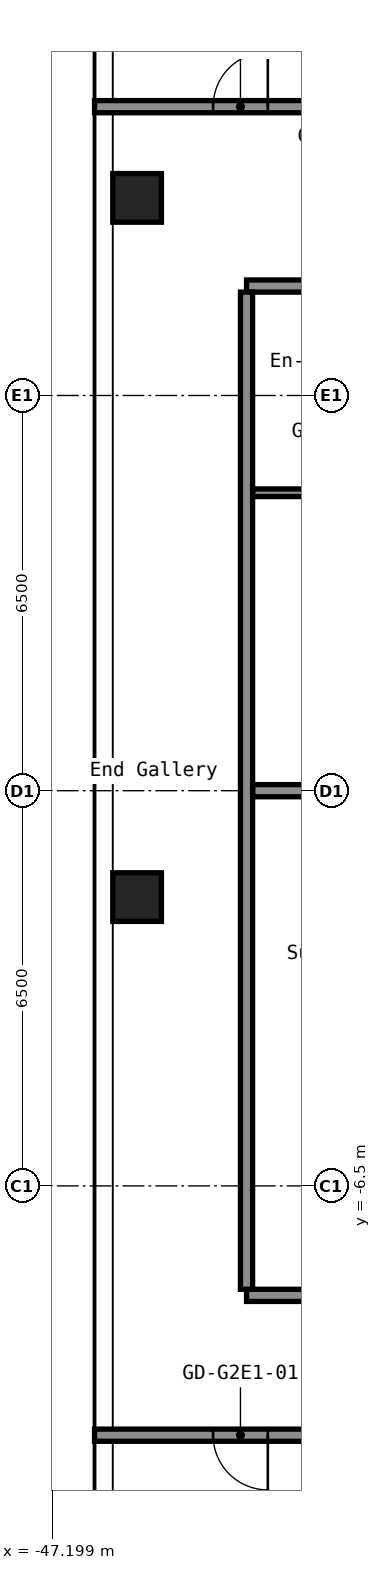
"""IFC4 building model, lengths in metres.
Left out: names, types, materials, properties, quantities, classifications, styles, units other than length and angle.
Written with IfcOpenShell. Run it as: python <this file> out.ifc"""

import sys

from ifc_helpers import new_model, si_unit, direction, frame, frame_2d, origin, origin_2d, place, context, subcontext, project, spatial, rectangle, hollow_rectangle, extrude, element, fill, save


model = new_model("IFC4")
c1 = context("Model", 3, precision=1e-05, world=origin(), true_north=direction((0.0, 1.0)))
c2 = subcontext(c1, "Body", "Model", "MODEL_VIEW")
j1 = project(units=[si_unit("LENGTHUNIT", "METRE"), si_unit("PLANEANGLEUNIT", "RADIAN")], contexts=[c1])
p1 = place(None, origin())
s1 = spatial("IfcSite", under=j1, at=p1, CompositionType="ELEMENT")
p2 = place(p1, origin())
s2 = spatial("IfcBuilding", under=s1, at=p2, CompositionType="ELEMENT")
p3 = place(p2, frame((0.0, 0.0, 104.2)))
s3 = spatial("IfcBuildingStorey", under=s2, at=p3, CompositionType="ELEMENT", Elevation=104.2)
for number, where, z_axis, x_axis in (
    (1, (-45.8, -1.75, 0.0), (0.0, 0.0, 1.0), (1.0, 0.0, 0.0)),
    (2, (-45.8, 9.75, 0.0), (0.0, 0.0, 1.0), (1.0, 0.0, 0.0)),
):
    element("IfcColumn", number, at=place(p3, frame(where, z_axis=z_axis, x_axis=x_axis)), inside=s3, PredefinedType="COLUMN", context=c2, shape_type="SweptSolid", body=[
        extrude(hollow_rectangle(XDim=0.8, YDim=0.8, WallThickness=0.032, at=origin_2d()), origin(), (0.0, 0.0, 1.0), 2.8),
    ])
p4 = place(p3, frame((-46.5, -10.6, 0.0), z_axis=(0.0, 0.0, 1.0), x_axis=(1.0, 0.0, 0.0)))
e3 = element("IfcWall", 3, at=p4, inside=s3, PredefinedType="PARTITIONING", context=c2, shape_type="SweptSolid", body=[
    extrude(rectangle(XDim=29.7, YDim=0.2, at=frame_2d((14.85, 0.0))), origin(), (0.0, 0.0, 1.0), 2.8),
])
p5 = place(p4, frame((1.95, 0.0, 0.0)))
e4 = element("IfcOpeningElement", 4, at=p5, cuts=e3, PredefinedType="OPENING", context=c2, shape_type="SweptSolid", body=[
    extrude(rectangle(XDim=0.9, YDim=2.1, at=frame_2d((0.45, 1.05))), frame((0.0, 0.11, 0.0), z_axis=(0.0, -1.0, 0.0), x_axis=(1.0, 0.0, 0.0)), (0.0, 0.0, 1.0), 0.22),
])
p6 = place(p4, frame((6.74, 0.0, 0.0)))
e5 = element("IfcOpeningElement", 5, at=p6, cuts=e3, PredefinedType="OPENING", context=c2, shape_type="SweptSolid", body=[
    extrude(rectangle(XDim=0.9, YDim=2.1, at=frame_2d((0.45, 1.05))), frame((0.0, 0.11, 0.0), z_axis=(0.0, -1.0, 0.0), x_axis=(1.0, 0.0, 0.0)), (0.0, 0.0, 1.0), 0.22),
])
p7 = place(p4, frame((10.94, 0.0, 0.0)))
e6 = element("IfcOpeningElement", 6, at=p7, cuts=e3, PredefinedType="OPENING", context=c2, shape_type="SweptSolid", body=[
    extrude(rectangle(XDim=0.9, YDim=2.1, at=frame_2d((0.45, 1.05))), frame((0.0, 0.11, 0.0), z_axis=(0.0, -1.0, 0.0), x_axis=(1.0, 0.0, 0.0)), (0.0, 0.0, 1.0), 0.22),
])
p8 = place(p4, frame((14.045, 0.0, 0.0)))
e7 = element("IfcOpeningElement", 7, at=p8, cuts=e3, PredefinedType="OPENING", context=c2, shape_type="SweptSolid", body=[
    extrude(rectangle(XDim=0.9, YDim=2.1, at=frame_2d((0.45, 1.05))), frame((0.0, 0.11, 0.0), z_axis=(0.0, -1.0, 0.0), x_axis=(1.0, 0.0, 0.0)), (0.0, 0.0, 1.0), 0.22),
])
p9 = place(p4, frame((18.245, 0.0, 0.0)))
e8 = element("IfcOpeningElement", 8, at=p9, cuts=e3, PredefinedType="OPENING", context=c2, shape_type="SweptSolid", body=[
    extrude(rectangle(XDim=0.9, YDim=2.1, at=frame_2d((0.45, 1.05))), frame((0.0, 0.11, 0.0), z_axis=(0.0, -1.0, 0.0), x_axis=(1.0, 0.0, 0.0)), (0.0, 0.0, 1.0), 0.22),
])
p10 = place(p4, frame((25.0, 0.0, 0.0)))
e9 = element("IfcOpeningElement", 9, at=p10, cuts=e3, PredefinedType="OPENING", context=c2, shape_type="SweptSolid", body=[
    extrude(rectangle(XDim=1.0, YDim=2.1, at=frame_2d((0.5, 1.05))), frame((0.0, 0.11, 0.0), z_axis=(0.0, -1.0, 0.0), x_axis=(1.0, 0.0, 0.0)), (0.0, 0.0, 1.0), 0.22),
])
p11 = place(p3, frame((-44.0, -8.3, 0.0), z_axis=(0.0, 0.0, 1.0), x_axis=(1.0, 0.0, 0.0)))
e10 = element("IfcWall", 10, at=p11, inside=s3, PredefinedType="PARTITIONING", context=c2, shape_type="SweptSolid", body=[
    extrude(rectangle(XDim=10.4, YDim=0.2, at=frame_2d((5.2, 0.0))), origin(), (0.0, 0.0, 1.0), 2.8),
])
p12 = place(p11, frame((2.1, 0.0, 0.0)))
e11 = element("IfcOpeningElement", 11, at=p12, cuts=e10, PredefinedType="OPENING", context=c2, shape_type="SweptSolid", body=[
    extrude(rectangle(XDim=1.0, YDim=2.1, at=frame_2d((0.5, 1.05))), frame((0.0, 0.11, 0.0), z_axis=(0.0, -1.0, 0.0), x_axis=(1.0, 0.0, 0.0)), (0.0, 0.0, 1.0), 0.22),
])
p13 = place(p3, frame((-43.9, 0.0, 0.0), z_axis=(0.0, 0.0, 1.0), x_axis=(1.0, 0.0, 0.0)))
e12 = element("IfcWall", 12, at=p13, inside=s3, PredefinedType="PARTITIONING", context=c2, shape_type="SweptSolid", body=[
    extrude(rectangle(XDim=10.3, YDim=0.2, at=frame_2d((5.15, 0.0))), origin(), (0.0, 0.0, 1.0), 2.8),
])
p14 = place(p3, frame((-43.9, 4.9, 0.0), z_axis=(0.0, 0.0, 1.0), x_axis=(1.0, 0.0, 0.0)))
e13 = element("IfcWall", 13, at=p14, inside=s3, PredefinedType="PARTITIONING", context=c2, shape_type="SweptSolid", body=[
    extrude(rectangle(XDim=3.237, YDim=0.125, at=frame_2d((1.619, 0.0))), origin(), (0.0, 0.0, 1.0), 2.8),
])
p15 = place(p14, frame((1.2, 0.0, 0.0)))
e14 = element("IfcOpeningElement", 14, at=p15, cuts=e13, PredefinedType="OPENING", context=c2, shape_type="SweptSolid", body=[
    extrude(rectangle(XDim=0.8, YDim=2.1, at=frame_2d((0.4, 1.05))), frame((0.0, 0.073, 0.0), z_axis=(0.0, -1.0, 0.0), x_axis=(1.0, 0.0, 0.0)), (0.0, 0.0, 1.0), 0.145),
])
p16 = place(p3, frame((-44.0, 8.3, 0.0), z_axis=(0.0, 0.0, 1.0), x_axis=(1.0, 0.0, 0.0)))
e15 = element("IfcWall", 15, at=p16, inside=s3, PredefinedType="PARTITIONING", context=c2, shape_type="SweptSolid", body=[
    extrude(rectangle(XDim=10.4, YDim=0.2, at=frame_2d((5.2, 0.0))), origin(), (0.0, 0.0, 1.0), 2.8),
])
p17 = place(p16, frame((6.35, 0.0, 0.0)))
e16 = element("IfcOpeningElement", 16, at=p17, cuts=e15, PredefinedType="OPENING", context=c2, shape_type="SweptSolid", body=[
    extrude(rectangle(XDim=1.0, YDim=2.1, at=frame_2d((0.5, 1.05))), frame((0.0, 0.11, 0.0), z_axis=(0.0, -1.0, 0.0), x_axis=(1.0, 0.0, 0.0)), (0.0, 0.0, 1.0), 0.22),
])
p18 = place(p3, frame((-46.5, 11.25, 0.0), z_axis=(0.0, 0.0, 1.0), x_axis=(1.0, 0.0, 0.0)))
e17 = element("IfcWall", 17, at=p18, inside=s3, PredefinedType="PARTITIONING", context=c2, shape_type="SweptSolid", body=[
    extrude(rectangle(XDim=29.7, YDim=0.2, at=frame_2d((14.85, 0.0))), origin(), (0.0, 0.0, 1.0), 2.8),
])
p19 = place(p18, frame((1.95, 0.0, 0.0)))
e18 = element("IfcOpeningElement", 18, at=p19, cuts=e17, PredefinedType="OPENING", context=c2, shape_type="SweptSolid", body=[
    extrude(rectangle(XDim=0.9, YDim=2.1, at=frame_2d((0.45, 1.05))), frame((0.0, 0.11, 0.0), z_axis=(0.0, -1.0, 0.0), x_axis=(1.0, 0.0, 0.0)), (0.0, 0.0, 1.0), 0.22),
])
p20 = place(p18, frame((5.73, 0.0, 0.0)))
e19 = element("IfcOpeningElement", 19, at=p20, cuts=e17, PredefinedType="OPENING", context=c2, shape_type="SweptSolid", body=[
    extrude(rectangle(XDim=0.9, YDim=2.1, at=frame_2d((0.45, 1.05))), frame((0.0, 0.11, 0.0), z_axis=(0.0, -1.0, 0.0), x_axis=(1.0, 0.0, 0.0)), (0.0, 0.0, 1.0), 0.22),
])
p21 = place(p18, frame((9.93, 0.0, 0.0)))
e20 = element("IfcOpeningElement", 20, at=p21, cuts=e17, PredefinedType="OPENING", context=c2, shape_type="SweptSolid", body=[
    extrude(rectangle(XDim=0.9, YDim=2.1, at=frame_2d((0.45, 1.05))), frame((0.0, 0.11, 0.0), z_axis=(0.0, -1.0, 0.0), x_axis=(1.0, 0.0, 0.0)), (0.0, 0.0, 1.0), 0.22),
])
p22 = place(p18, frame((16.6, 0.0, 0.0)))
e21 = element("IfcOpeningElement", 21, at=p22, cuts=e17, PredefinedType="OPENING", context=c2, shape_type="SweptSolid", body=[
    extrude(rectangle(XDim=1.0, YDim=2.1, at=frame_2d((0.5, 1.05))), frame((0.0, 0.11, 0.0), z_axis=(0.0, -1.0, 0.0), x_axis=(1.0, 0.0, 0.0)), (0.0, 0.0, 1.0), 0.22),
])
p23 = place(p18, frame((22.78, 0.0, 0.0)))
e22 = element("IfcOpeningElement", 22, at=p23, cuts=e17, PredefinedType="OPENING", context=c2, shape_type="SweptSolid", body=[
    extrude(rectangle(XDim=0.9, YDim=2.1, at=frame_2d((0.45, 1.05))), frame((0.0, 0.11, 0.0), z_axis=(0.0, -1.0, 0.0), x_axis=(1.0, 0.0, 0.0)), (0.0, 0.0, 1.0), 0.22),
])
p24 = place(p18, frame((26.98, 0.0, 0.0)))
e23 = element("IfcOpeningElement", 23, at=p24, cuts=e17, PredefinedType="OPENING", context=c2, shape_type="SweptSolid", body=[
    extrude(rectangle(XDim=0.9, YDim=2.1, at=frame_2d((0.45, 1.05))), frame((0.0, 0.11, 0.0), z_axis=(0.0, -1.0, 0.0), x_axis=(1.0, 0.0, 0.0)), (0.0, 0.0, 1.0), 0.22),
])
p25 = place(p3, frame((-44.0, -8.2, 0.0), z_axis=(0.0, 0.0, 1.0), x_axis=(0.0, 1.0, 0.0)))
e24 = element("IfcWall", 24, at=p25, inside=s3, PredefinedType="PARTITIONING", context=c2, shape_type="SweptSolid", body=[
    extrude(rectangle(XDim=16.4, YDim=0.2, at=frame_2d((8.2, 0.0))), origin(), (0.0, 0.0, 1.0), 2.8),
])
p26 = place(p5, origin())
e25 = element("IfcDoor", 25, at=p26, inside=s3, OperationType="SINGLE_SWING_RIGHT", PredefinedType="DOOR", context=c2, shape_type="SweptSolid", body=[
    extrude(rectangle(XDim=0.9, YDim=2.1, at=frame_2d((0.45, 1.05))), frame((0.0, 0.025, 0.0), z_axis=(0.0, -1.0, 0.0), x_axis=(1.0, 0.0, 0.0)), (0.0, 0.0, 1.0), 0.05),
])
fill(e4, e25)
p27 = place(p19, origin())
e26 = element("IfcDoor", 26, at=p27, inside=s3, OperationType="SINGLE_SWING_LEFT", PredefinedType="DOOR", context=c2, shape_type="SweptSolid", body=[
    extrude(rectangle(XDim=0.9, YDim=2.1, at=frame_2d((0.45, 1.05))), frame((0.0, 0.025, 0.0), z_axis=(0.0, -1.0, 0.0), x_axis=(1.0, 0.0, 0.0)), (0.0, 0.0, 1.0), 0.05),
])
fill(e18, e26)
save(model, sys.argv[1])
